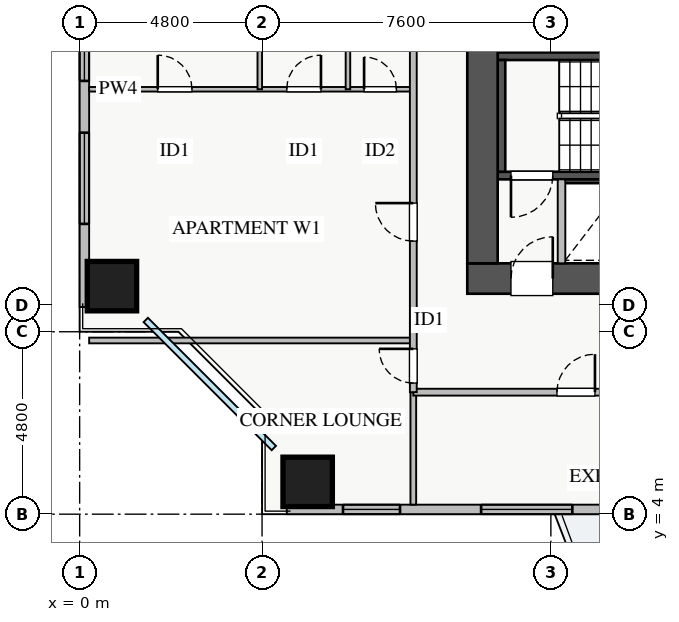
"""IFC4 building model, lengths in metres.
Left out: names, types, materials, properties, quantities, classifications, styles, units other than length and angle.
Written with IfcOpenShell. Run it as: python <this file> out.ifc"""

import sys

from ifc_helpers import new_model, si_unit, direction, frame, frame_2d, origin, origin_2d, place, context, subcontext, project, spatial, rectangle, extrude, source, transform, mapped, element, fill, save


model = new_model("IFC4")
c1 = context("Model", 3, precision=1e-05, world=origin(), true_north=direction((0.0, 1.0)))
c2 = subcontext(c1, "Body", "Model", "MODEL_VIEW")
j1 = project(units=[si_unit("LENGTHUNIT", "METRE"), si_unit("PLANEANGLEUNIT", "RADIAN")], contexts=[c1])
p1 = place(None, origin())
s1 = spatial("IfcSite", under=j1, at=p1, CompositionType="ELEMENT")
p2 = place(p1, origin())
s2 = spatial("IfcBuilding", under=s1, at=p2, CompositionType="ELEMENT")
p3 = place(p2, frame((0.0, 0.0, 23.0)))
s3 = spatial("IfcBuildingStorey", under=s2, at=p3, CompositionType="ELEMENT", Elevation=23.0)
p4 = place(p3, frame((12.68, 12.8, 0.0), z_axis=(0.0, 0.0, 1.0), x_axis=(1.0, 0.0, 0.0)))
e1 = element("IfcWall", 1, at=p4, inside=s3, PredefinedType="SHEAR", context=c2, shape_type="SweptSolid", body=[
    extrude(rectangle(XDim=1.94, YDim=0.18, at=frame_2d((0.97, 0.0))), origin(), (0.0, 0.0, 1.0), 3.07),
])
p5 = place(p3, frame((11.0, 12.91, 0.0), z_axis=(0.0, 0.0, 1.0), x_axis=(1.0, 0.0, 0.0)))
e2 = element("IfcWall", 2, at=p5, inside=s3, PredefinedType="SHEAR", context=c2, shape_type="SweptSolid", body=[
    extrude(rectangle(XDim=7.15, YDim=0.2, at=frame_2d((3.575, 0.0))), origin(), (0.0, 0.0, 1.0), 3.25),
])
p6 = place(p5, frame((0.35, 0.0, 0.0)))
e3 = element("IfcOpeningElement", 3, at=p6, cuts=e2, PredefinedType="OPENING", context=c2, shape_type="SweptSolid", body=[
    extrude(rectangle(XDim=1.1, YDim=2.05, at=frame_2d((0.55, 1.025))), frame((0.0, 0.11, 0.0), z_axis=(0.0, -1.0, 0.0), x_axis=(1.0, 0.0, 0.0)), (0.0, 0.0, 1.0), 0.22),
])
p7 = place(p3, frame((11.0, 16.05, 0.0), z_axis=(0.0, 0.0, 1.0), x_axis=(1.0, 0.0, 0.0)))
e4 = element("IfcWall", 4, at=p7, inside=s3, PredefinedType="SHEAR", context=c2, shape_type="SweptSolid", body=[
    extrude(rectangle(XDim=7.15, YDim=0.2, at=frame_2d((3.575, 0.0))), origin(), (0.0, 0.0, 1.0), 3.25),
])
p8 = place(p3, frame((11.1, 13.01, 0.0), z_axis=(0.0, 0.0, 1.0), x_axis=(0.0, 1.0, 0.0)))
e5 = element("IfcWall", 5, at=p8, inside=s3, PredefinedType="SHEAR", context=c2, shape_type="SweptSolid", body=[
    extrude(rectangle(XDim=2.94, YDim=0.2, at=frame_2d((1.47, 0.0))), origin(), (0.0, 0.0, 1.0), 3.25),
])
p9 = place(p3, frame((10.2, 10.2, 0.0), z_axis=(0.0, 0.0, 1.0), x_axis=(1.0, 0.0, 0.0)))
e6 = element("IfcWall", 6, at=p9, inside=s3, PredefinedType="SHEAR", context=c2, shape_type="SweptSolid", body=[
    extrude(rectangle(XDim=17.6, YDim=0.8, at=frame_2d((8.8, 0.0))), origin(), (0.0, 0.0, 1.0), 3.25),
])
p10 = place(p9, frame((1.15, 0.0, 0.0)))
e7 = element("IfcOpeningElement", 7, at=p10, cuts=e6, PredefinedType="OPENING", context=c2, shape_type="SweptSolid", body=[
    extrude(rectangle(XDim=1.1, YDim=2.05, at=frame_2d((0.55, 1.025))), frame((0.0, 0.41, 0.0), z_axis=(0.0, -1.0, 0.0), x_axis=(1.0, 0.0, 0.0)), (0.0, 0.0, 1.0), 0.82),
])
p11 = place(p9, frame((8.3, 0.0, 0.0)))
e8 = element("IfcOpeningElement", 8, at=p11, cuts=e6, PredefinedType="OPENING", context=c2, shape_type="SweptSolid", body=[
    extrude(rectangle(XDim=1.1, YDim=2.05, at=frame_2d((0.55, 1.025))), frame((0.0, 0.41, 0.0), z_axis=(0.0, -1.0, 0.0), x_axis=(1.0, 0.0, 0.0)), (0.0, 0.0, 1.0), 0.82),
])
p12 = place(p9, frame((10.05, 0.0, 0.0)))
e9 = element("IfcOpeningElement", 9, at=p12, cuts=e6, PredefinedType="OPENING", context=c2, shape_type="SweptSolid", body=[
    extrude(rectangle(XDim=1.1, YDim=2.05, at=frame_2d((0.55, 1.025))), frame((0.0, 0.41, 0.0), z_axis=(0.0, -1.0, 0.0), x_axis=(1.0, 0.0, 0.0)), (0.0, 0.0, 1.0), 0.82),
])
p13 = place(p9, frame((14.74, 0.0, 0.0)))
e10 = element("IfcOpeningElement", 10, at=p13, cuts=e6, PredefinedType="OPENING", context=c2, shape_type="SweptSolid", body=[
    extrude(rectangle(XDim=1.0, YDim=2.05, at=frame_2d((0.5, 1.025))), frame((0.0, 0.41, 0.0), z_axis=(0.0, -1.0, 0.0), x_axis=(1.0, 0.0, 0.0)), (0.0, 0.0, 1.0), 0.82),
])
p14 = place(p9, frame((11.835, 0.0, 0.0)))
e11 = element("IfcOpeningElement", 11, at=p14, cuts=e6, PredefinedType="OPENING", context=c2, shape_type="SweptSolid", body=[
    extrude(rectangle(XDim=1.0, YDim=2.05, at=frame_2d((0.5, 1.025))), frame((0.0, 0.41, 0.0), z_axis=(0.0, -1.0, 0.0), x_axis=(1.0, 0.0, 0.0)), (0.0, 0.0, 1.0), 0.82),
])
p15 = place(p9, frame((13.37, 0.0, 0.0)))
e12 = element("IfcOpeningElement", 12, at=p15, cuts=e6, PredefinedType="OPENING", context=c2, shape_type="SweptSolid", body=[
    extrude(rectangle(XDim=1.0, YDim=2.05, at=frame_2d((0.5, 1.025))), frame((0.0, 0.41, 0.0), z_axis=(0.0, -1.0, 0.0), x_axis=(1.0, 0.0, 0.0)), (0.0, 0.0, 1.0), 0.82),
])
p16 = place(p3, frame((10.6, 10.6, 0.0), z_axis=(0.0, 0.0, 1.0), x_axis=(0.0, 1.0, 0.0)))
e13 = element("IfcWall", 13, at=p16, inside=s3, PredefinedType="SHEAR", context=c2, shape_type="SweptSolid", body=[
    extrude(rectangle(XDim=5.6, YDim=0.8, at=frame_2d((2.8, 0.0))), origin(), (0.0, 0.0, 1.0), 3.25),
])
m1 = source(origin(), c2, "Body", "SweptSolid", [
    extrude(rectangle(XDim=1.3, YDim=1.3, at=origin_2d()), origin(), (0.0, 0.0, 1.0), 3.25),
])
for number, where, z_axis, x_axis in (
    (14, (6.0, 4.85, 0.0), (0.0, 0.0, 1.0), (1.0, 0.0, 0.0)),
    (15, (0.85, 10.0, 0.0), (0.0, 0.0, 1.0), (1.0, 0.0, 0.0)),
):
    element("IfcColumn", number, at=place(p3, frame(where, z_axis=z_axis, x_axis=x_axis)), inside=s3, PredefinedType="COLUMN", context=c2, shape_type="MappedRepresentation", body=[
        mapped(m1, transform((0.0, 0.0, 0.0), x_axis=(1.0, 0.0, 0.0), y_axis=(0.0, 1.0, 0.0), z_axis=(0.0, 0.0, 1.0), scale=1.0)),
    ])
p17 = place(p3, frame((5.45, 4.125, 0.0), z_axis=(0.0, 0.0, 1.0), x_axis=(1.0, 0.0, 0.0)))
e16 = element("IfcWall", 16, at=p17, inside=s3, PredefinedType="STANDARD", context=c2, shape_type="SweptSolid", body=[
    extrude(rectangle(XDim=27.1, YDim=0.25, at=frame_2d((13.55, 0.0))), origin(), (0.0, 0.0, 1.0), 2.61),
])
p18 = place(p17, frame((14.4, 0.0, 0.0)))
e17 = element("IfcOpeningElement", 17, at=p18, cuts=e16, PredefinedType="OPENING", context=c2, shape_type="SweptSolid", body=[
    extrude(rectangle(XDim=1.2, YDim=2.1, at=frame_2d((0.6, 1.05))), frame((0.0, 0.135, 0.0), z_axis=(0.0, -1.0, 0.0), x_axis=(1.0, 0.0, 0.0)), (0.0, 0.0, 1.0), 0.27),
])
p19 = place(p17, frame((1.48, 0.0, 0.9)))
e18 = element("IfcOpeningElement", 18, at=p19, cuts=e16, PredefinedType="OPENING", context=c2, shape_type="SweptSolid", body=[
    extrude(rectangle(XDim=1.5, YDim=1.5, at=frame_2d((0.75, 0.75))), frame((0.0, 0.135, 0.0), z_axis=(0.0, -1.0, 0.0), x_axis=(1.0, 0.0, 0.0)), (0.0, 0.0, 1.0), 0.27),
])
p20 = place(p17, frame((9.263, 0.0, 0.9)))
e19 = element("IfcOpeningElement", 19, at=p20, cuts=e16, PredefinedType="OPENING", context=c2, shape_type="SweptSolid", body=[
    extrude(rectangle(XDim=1.8, YDim=1.45, at=frame_2d((0.9, 0.725))), frame((0.0, 0.135, 0.0), z_axis=(0.0, -1.0, 0.0), x_axis=(1.0, 0.0, 0.0)), (0.0, 0.0, 1.0), 0.27),
])
p21 = place(p17, frame((16.188, 0.0, 0.9)))
e20 = element("IfcOpeningElement", 20, at=p21, cuts=e16, PredefinedType="OPENING", context=c2, shape_type="SweptSolid", body=[
    extrude(rectangle(XDim=1.5, YDim=1.45, at=frame_2d((0.75, 0.725))), frame((0.0, 0.135, 0.0), z_axis=(0.0, -1.0, 0.0), x_axis=(1.0, 0.0, 0.0)), (0.0, 0.0, 1.0), 0.27),
])
p22 = place(p17, frame((22.663, 0.0, 0.9)))
e21 = element("IfcOpeningElement", 21, at=p22, cuts=e16, PredefinedType="OPENING", context=c2, shape_type="SweptSolid", body=[
    extrude(rectangle(XDim=2.1, YDim=1.48, at=frame_2d((1.05, 0.74))), frame((0.0, 0.135, 0.0), z_axis=(0.0, -1.0, 0.0), x_axis=(1.0, 0.0, 0.0)), (0.0, 0.0, 1.0), 0.27),
])
p23 = place(p17, frame((5.114, 0.0, 0.9)))
e22 = element("IfcOpeningElement", 22, at=p23, cuts=e16, PredefinedType="OPENING", context=c2, shape_type="SweptSolid", body=[
    extrude(rectangle(XDim=2.4, YDim=1.5, at=frame_2d((1.2, 0.75))), frame((0.0, 0.135, 0.0), z_axis=(0.0, -1.0, 0.0), x_axis=(1.0, 0.0, 0.0)), (0.0, 0.0, 1.0), 0.27),
])
p24 = place(p3, frame((0.125, 9.45, 0.0), z_axis=(0.0, 0.0, 1.0), x_axis=(0.0, 1.0, 0.0)))
e23 = element("IfcWall", 23, at=p24, inside=s3, PredefinedType="STANDARD", context=c2, shape_type="SweptSolid", body=[
    extrude(rectangle(XDim=27.1, YDim=0.25, at=frame_2d((13.55, 0.0))), origin(), (0.0, 0.0, 1.0), 2.61),
])
p25 = place(p24, frame((14.4, 0.0, 0.0)))
e24 = element("IfcOpeningElement", 24, at=p25, cuts=e23, PredefinedType="OPENING", context=c2, shape_type="SweptSolid", body=[
    extrude(rectangle(XDim=1.2, YDim=2.1, at=frame_2d((0.6, 1.05))), frame((0.0, 0.135, 0.0), z_axis=(0.0, -1.0, 0.0), x_axis=(1.0, 0.0, 0.0)), (0.0, 0.0, 1.0), 0.27),
])
p26 = place(p24, frame((2.188, 0.0, 0.9)))
e25 = element("IfcOpeningElement", 25, at=p26, cuts=e23, PredefinedType="OPENING", context=c2, shape_type="SweptSolid", body=[
    extrude(rectangle(XDim=2.4, YDim=1.48, at=frame_2d((1.2, 0.74))), frame((0.0, 0.135, 0.0), z_axis=(0.0, -1.0, 0.0), x_axis=(1.0, 0.0, 0.0)), (0.0, 0.0, 1.0), 0.27),
])
p27 = place(p24, frame((22.663, 0.0, 0.9)))
e26 = element("IfcOpeningElement", 26, at=p27, cuts=e23, PredefinedType="OPENING", context=c2, shape_type="SweptSolid", body=[
    extrude(rectangle(XDim=2.1, YDim=1.48, at=frame_2d((1.05, 0.74))), frame((0.0, 0.135, 0.0), z_axis=(0.0, -1.0, 0.0), x_axis=(1.0, 0.0, 0.0)), (0.0, 0.0, 1.0), 0.27),
])
p28 = place(p24, frame((5.95, 0.0, 0.9)))
e27 = element("IfcOpeningElement", 27, at=p28, cuts=e23, PredefinedType="OPENING", context=c2, shape_type="SweptSolid", body=[
    extrude(rectangle(XDim=0.9, YDim=1.2, at=frame_2d((0.45, 0.6))), frame((0.0, 0.135, 0.0), z_axis=(0.0, -1.0, 0.0), x_axis=(1.0, 0.0, 0.0)), (0.0, 0.0, 1.0), 0.27),
])
p29 = place(p3, frame((12.68, 10.6, 0.0), z_axis=(0.0, 0.0, 1.0), x_axis=(0.0, 1.0, 0.0)))
e28 = element("IfcWall", 28, at=p29, inside=s3, PredefinedType="PARTITIONING", context=c2, shape_type="SweptSolid", body=[
    extrude(rectangle(XDim=2.21, YDim=0.2, at=frame_2d((1.105, 0.0))), origin(), (0.0, 0.0, 1.0), 3.07),
])
p30 = place(p3, frame((8.78, 4.25, 0.0), z_axis=(0.0, 0.0, 1.0), x_axis=(0.0, 1.0, 0.0)))
e29 = element("IfcWall", 29, at=p30, inside=s3, PredefinedType="PARTITIONING", context=c2, shape_type="SweptSolid", body=[
    extrude(rectangle(XDim=2.96, YDim=0.15, at=frame_2d((1.48, 0.0))), origin(), (0.0, 0.0, 1.0), 3.07),
])
p31 = place(p3, frame((8.78, 7.21, 0.0), z_axis=(0.0, 0.0, 1.0), x_axis=(1.0, 0.0, 0.0)))
e30 = element("IfcWall", 30, at=p31, inside=s3, PredefinedType="PARTITIONING", context=c2, shape_type="SweptSolid", body=[
    extrude(rectangle(XDim=23.54, YDim=0.18, at=frame_2d((11.77, 0.0))), origin(), (0.0, 0.0, 1.0), 3.07),
])
p32 = place(p31, frame((3.78, 0.0, 0.0)))
e31 = element("IfcOpeningElement", 31, at=p32, cuts=e30, PredefinedType="OPENING", context=c2, shape_type="SweptSolid", body=[
    extrude(rectangle(XDim=1.0, YDim=2.05, at=frame_2d((0.5, 1.025))), frame((0.0, 0.1, 0.0), z_axis=(0.0, -1.0, 0.0), x_axis=(1.0, 0.0, 0.0)), (0.0, 0.0, 1.0), 0.2),
])
p33 = place(p31, frame((11.625, 0.0, 0.0)))
e32 = element("IfcOpeningElement", 32, at=p33, cuts=e30, PredefinedType="OPENING", context=c2, shape_type="SweptSolid", body=[
    extrude(rectangle(XDim=1.0, YDim=2.05, at=frame_2d((0.5, 1.025))), frame((0.0, 0.1, 0.0), z_axis=(0.0, -1.0, 0.0), x_axis=(1.0, 0.0, 0.0)), (0.0, 0.0, 1.0), 0.2),
])
p34 = place(p31, frame((19.115, 0.0, 0.0)))
e33 = element("IfcOpeningElement", 33, at=p34, cuts=e30, PredefinedType="OPENING", context=c2, shape_type="SweptSolid", body=[
    extrude(rectangle(XDim=1.0, YDim=2.05, at=frame_2d((0.5, 1.025))), frame((0.0, 0.1, 0.0), z_axis=(0.0, -1.0, 0.0), x_axis=(1.0, 0.0, 0.0)), (0.0, 0.0, 1.0), 0.2),
])
p35 = place(p3, frame((0.25, 8.57, 0.0), z_axis=(0.0, 0.0, 1.0), x_axis=(1.0, 0.0, 0.0)))
e34 = element("IfcWall", 34, at=p35, inside=s3, PredefinedType="PARTITIONING", context=c2, shape_type="SweptSolid", body=[
    extrude(rectangle(XDim=8.53, YDim=0.15, at=frame_2d((4.265, 0.0))), origin(), (0.0, 0.0, 1.0), 3.07),
])
p36 = place(p3, frame((0.25, 15.18, 0.0), z_axis=(0.0, 0.0, 1.0), x_axis=(1.0, 0.0, 0.0)))
e35 = element("IfcWall", 35, at=p36, inside=s3, PredefinedType="PLUMBINGWALL", context=c2, shape_type="SweptSolid", body=[
    extrude(rectangle(XDim=8.53, YDim=0.12, at=frame_2d((4.265, 0.0))), origin(), (0.0, 0.0, 1.0), 3.07),
])
p37 = place(p36, frame((1.805, 0.0, 0.0)))
e36 = element("IfcOpeningElement", 36, at=p37, cuts=e35, PredefinedType="OPENING", context=c2, shape_type="SweptSolid", body=[
    extrude(rectangle(XDim=0.9, YDim=2.05, at=frame_2d((0.45, 1.025))), frame((0.0, 0.07, 0.0), z_axis=(0.0, -1.0, 0.0), x_axis=(1.0, 0.0, 0.0)), (0.0, 0.0, 1.0), 0.14),
])
p38 = place(p36, frame((5.2, 0.0, 0.0)))
e37 = element("IfcOpeningElement", 37, at=p38, cuts=e35, PredefinedType="OPENING", context=c2, shape_type="SweptSolid", body=[
    extrude(rectangle(XDim=0.9, YDim=2.05, at=frame_2d((0.45, 1.025))), frame((0.0, 0.07, 0.0), z_axis=(0.0, -1.0, 0.0), x_axis=(1.0, 0.0, 0.0)), (0.0, 0.0, 1.0), 0.14),
])
p39 = place(p36, frame((7.235, 0.0, 0.0)))
e38 = element("IfcOpeningElement", 38, at=p39, cuts=e35, PredefinedType="OPENING", context=c2, shape_type="SweptSolid", body=[
    extrude(rectangle(XDim=0.85, YDim=2.05, at=frame_2d((0.425, 1.025))), frame((0.0, 0.07, 0.0), z_axis=(0.0, -1.0, 0.0), x_axis=(1.0, 0.0, 0.0)), (0.0, 0.0, 1.0), 0.14),
])
for number, where, z_axis, x_axis in (
    (39, (4.74, 15.18, 0.0), (0.0, 0.0, 1.0), (0.0, 1.0, 0.0)),
    (40, (7.06, 15.18, 0.0), (0.0, 0.0, 1.0), (0.0, 1.0, 0.0)),
):
    element("IfcWall", number, at=place(p3, frame(where, z_axis=z_axis, x_axis=x_axis)), inside=s3, PredefinedType="PLUMBINGWALL", context=c2, shape_type="SweptSolid", body=[
        extrude(rectangle(XDim=7.16, YDim=0.12, at=frame_2d((3.58, 0.0))), origin(), (0.0, 0.0, 1.0), 3.07),
    ])
p40 = place(p3, frame((8.78, 7.21, 0.0), z_axis=(0.0, 0.0, 1.0), x_axis=(0.0, 1.0, 0.0)))
e41 = element("IfcWall", 41, at=p40, inside=s3, PredefinedType="PARTITIONING", context=c2, shape_type="SweptSolid", body=[
    extrude(rectangle(XDim=31.23, YDim=0.18, at=frame_2d((15.615, 0.0))), origin(), (0.0, 0.0, 1.0), 3.07),
])
p41 = place(p40, frame((30.09, 0.0, 0.0)))
e42 = element("IfcOpeningElement", 42, at=p41, cuts=e41, PredefinedType="OPENING", context=c2, shape_type="SweptSolid", body=[
    extrude(rectangle(XDim=0.9, YDim=2.05, at=frame_2d((0.45, 1.025))), frame((0.0, 0.1, 0.0), z_axis=(0.0, -1.0, 0.0), x_axis=(1.0, 0.0, 0.0)), (0.0, 0.0, 1.0), 0.2),
])
p42 = place(p40, frame((0.24, 0.0, 0.0)))
e43 = element("IfcOpeningElement", 43, at=p42, cuts=e41, PredefinedType="OPENING", context=c2, shape_type="SweptSolid", body=[
    extrude(rectangle(XDim=0.9, YDim=2.05, at=frame_2d((0.45, 1.025))), frame((0.0, 0.1, 0.0), z_axis=(0.0, -1.0, 0.0), x_axis=(1.0, 0.0, 0.0)), (0.0, 0.0, 1.0), 0.2),
])
p43 = place(p40, frame((3.975, 0.0, 0.0)))
e44 = element("IfcOpeningElement", 44, at=p43, cuts=e41, PredefinedType="OPENING", context=c2, shape_type="SweptSolid", body=[
    extrude(rectangle(XDim=1.0, YDim=2.05, at=frame_2d((0.5, 1.025))), frame((0.0, 0.1, 0.0), z_axis=(0.0, -1.0, 0.0), x_axis=(1.0, 0.0, 0.0)), (0.0, 0.0, 1.0), 0.2),
])
p44 = place(p40, frame((22.0, 0.0, 0.0)))
e45 = element("IfcOpeningElement", 45, at=p44, cuts=e41, PredefinedType="OPENING", context=c2, shape_type="SweptSolid", body=[
    extrude(rectangle(XDim=1.0, YDim=2.05, at=frame_2d((0.5, 1.025))), frame((0.0, 0.1, 0.0), z_axis=(0.0, -1.0, 0.0), x_axis=(1.0, 0.0, 0.0)), (0.0, 0.0, 1.0), 0.2),
])
m2 = source(origin(), c2, "Body", "SweptSolid", [
    extrude(rectangle(XDim=1.5, YDim=1.5, at=frame_2d((0.75, 0.75))), frame((0.0, 0.03, 0.0), z_axis=(0.0, -1.0, 0.0), x_axis=(1.0, 0.0, 0.0)), (0.0, 0.0, 1.0), 0.06),
])
p45 = place(p19, origin())
e46 = element("IfcWindow", 46, at=p45, inside=s3, PartitioningType="TRIPLE_PANEL_VERTICAL", PredefinedType="WINDOW", context=c2, shape_type="MappedRepresentation", body=[
    mapped(m2, transform((0.0, 0.0, 0.0), x_axis=(1.0, 0.0, 0.0), y_axis=(0.0, 1.0, 0.0), z_axis=(0.0, 0.0, 1.0), scale=1.0)),
])
fill(e18, e46)
m3 = source(origin(), c2, "Body", "SweptSolid", [
    extrude(rectangle(XDim=2.4, YDim=1.48, at=frame_2d((1.2, 0.74))), frame((0.0, 0.03, 0.0), z_axis=(0.0, -1.0, 0.0), x_axis=(1.0, 0.0, 0.0)), (0.0, 0.0, 1.0), 0.06),
])
p46 = place(p26, origin())
e47 = element("IfcWindow", 47, at=p46, inside=s3, PartitioningType="TRIPLE_PANEL_VERTICAL", PredefinedType="WINDOW", context=c2, shape_type="MappedRepresentation", body=[
    mapped(m3, transform((0.0, 0.0, 0.0), x_axis=(1.0, 0.0, 0.0), y_axis=(0.0, 1.0, 0.0), z_axis=(0.0, 0.0, 1.0), scale=1.0)),
])
fill(e25, e47)
m4 = source(origin(), c2, "Body", "SweptSolid", [
    extrude(rectangle(XDim=1.1, YDim=2.05, at=frame_2d((0.55, 1.025))), frame((0.0, 0.025, 0.0), z_axis=(0.0, -1.0, 0.0), x_axis=(1.0, 0.0, 0.0)), (0.0, 0.0, 1.0), 0.05),
])
p47 = place(p10, origin())
e48 = element("IfcDoor", 48, at=p47, inside=s3, OperationType="SINGLE_SWING_RIGHT", PredefinedType="DOOR", context=c2, shape_type="MappedRepresentation", body=[
    mapped(m4, transform((0.0, 0.0, 0.0), x_axis=(1.0, 0.0, 0.0), y_axis=(0.0, 1.0, 0.0), z_axis=(0.0, 0.0, 1.0), scale=1.0)),
])
fill(e7, e48)
p48 = place(p6, frame((1.1, 0.0, 0.0), z_axis=(0.0, 0.0, 1.0), x_axis=(-1.0, 0.0, 0.0)))
e49 = element("IfcDoor", 49, at=p48, inside=s3, OperationType="SINGLE_SWING_LEFT", PredefinedType="DOOR", context=c2, shape_type="MappedRepresentation", body=[
    mapped(m4, transform((0.0, 0.0, 0.0), x_axis=(1.0, 0.0, 0.0), y_axis=(0.0, 1.0, 0.0), z_axis=(0.0, 0.0, 1.0), scale=1.0)),
])
fill(e3, e49)
m5 = source(origin(), c2, "Body", "SweptSolid", [
    extrude(rectangle(XDim=1.0, YDim=2.05, at=frame_2d((0.5, 1.025))), frame((0.0, 0.025, 0.0), z_axis=(0.0, -1.0, 0.0), x_axis=(1.0, 0.0, 0.0)), (0.0, 0.0, 1.0), 0.05),
])
p49 = place(p32, origin())
e50 = element("IfcDoor", 50, at=p49, inside=s3, OperationType="SINGLE_SWING_RIGHT", PredefinedType="DOOR", context=c2, shape_type="MappedRepresentation", body=[
    mapped(m5, transform((0.0, 0.0, 0.0), x_axis=(1.0, 0.0, 0.0), y_axis=(0.0, 1.0, 0.0), z_axis=(0.0, 0.0, 1.0), scale=1.0)),
])
fill(e31, e50)
m6 = source(origin(), c2, "Body", "SweptSolid", [
    extrude(rectangle(XDim=0.9, YDim=2.05, at=frame_2d((0.45, 1.025))), frame((0.0, 0.025, 0.0), z_axis=(0.0, -1.0, 0.0), x_axis=(1.0, 0.0, 0.0)), (0.0, 0.0, 1.0), 0.05),
])
p50 = place(p37, origin())
e51 = element("IfcDoor", 51, at=p50, inside=s3, OperationType="SINGLE_SWING_LEFT", PredefinedType="DOOR", context=c2, shape_type="MappedRepresentation", body=[
    mapped(m6, transform((0.0, 0.0, 0.0), x_axis=(1.0, 0.0, 0.0), y_axis=(0.0, 1.0, 0.0), z_axis=(0.0, 0.0, 1.0), scale=1.0)),
])
fill(e36, e51)
p51 = place(p38, origin())
e52 = element("IfcDoor", 52, at=p51, inside=s3, OperationType="SINGLE_SWING_RIGHT", PredefinedType="DOOR", context=c2, shape_type="MappedRepresentation", body=[
    mapped(m6, transform((0.0, 0.0, 0.0), x_axis=(1.0, 0.0, 0.0), y_axis=(0.0, 1.0, 0.0), z_axis=(0.0, 0.0, 1.0), scale=1.0)),
])
fill(e37, e52)
m7 = source(origin(), c2, "Body", "SweptSolid", [
    extrude(rectangle(XDim=0.85, YDim=2.05, at=frame_2d((0.425, 1.025))), frame((0.0, 0.025, 0.0), z_axis=(0.0, -1.0, 0.0), x_axis=(1.0, 0.0, 0.0)), (0.0, 0.0, 1.0), 0.05),
])
p52 = place(p39, origin())
e53 = element("IfcDoor", 53, at=p52, inside=s3, OperationType="SINGLE_SWING_LEFT", PredefinedType="DOOR", context=c2, shape_type="MappedRepresentation", body=[
    mapped(m7, transform((0.0, 0.0, 0.0), x_axis=(1.0, 0.0, 0.0), y_axis=(0.0, 1.0, 0.0), z_axis=(0.0, 0.0, 1.0), scale=1.0)),
])
fill(e38, e53)
p53 = place(p42, origin())
e54 = element("IfcDoor", 54, at=p53, inside=s3, OperationType="SINGLE_SWING_RIGHT", PredefinedType="DOOR", context=c2, shape_type="MappedRepresentation", body=[
    mapped(m6, transform((0.0, 0.0, 0.0), x_axis=(1.0, 0.0, 0.0), y_axis=(0.0, 1.0, 0.0), z_axis=(0.0, 0.0, 1.0), scale=1.0)),
])
fill(e43, e54)
p54 = place(p43, origin())
e55 = element("IfcDoor", 55, at=p54, inside=s3, OperationType="SINGLE_SWING_RIGHT", PredefinedType="DOOR", context=c2, shape_type="MappedRepresentation", body=[
    mapped(m5, transform((0.0, 0.0, 0.0), x_axis=(1.0, 0.0, 0.0), y_axis=(0.0, 1.0, 0.0), z_axis=(0.0, 0.0, 1.0), scale=1.0)),
])
fill(e44, e55)
m8 = source(origin(), c2, "Body", "SweptSolid", [
    extrude(rectangle(XDim=2.4, YDim=1.5, at=frame_2d((1.2, 0.75))), frame((0.0, 0.03, 0.0), z_axis=(0.0, -1.0, 0.0), x_axis=(1.0, 0.0, 0.0)), (0.0, 0.0, 1.0), 0.06),
])
p55 = place(p23, origin())
e56 = element("IfcWindow", 56, at=p55, inside=s3, PartitioningType="TRIPLE_PANEL_VERTICAL", PredefinedType="WINDOW", context=c2, shape_type="MappedRepresentation", body=[
    mapped(m8, transform((0.0, 0.0, 0.0), x_axis=(1.0, 0.0, 0.0), y_axis=(0.0, 1.0, 0.0), z_axis=(0.0, 0.0, 1.0), scale=1.0)),
])
fill(e22, e56)
m9 = source(origin(), c2, "Body", "SweptSolid", [
    extrude(rectangle(XDim=0.9, YDim=1.2, at=frame_2d((0.45, 0.6))), frame((0.0, 0.03, 0.0), z_axis=(0.0, -1.0, 0.0), x_axis=(1.0, 0.0, 0.0)), (0.0, 0.0, 1.0), 0.06),
])
p56 = place(p28, origin())
e57 = element("IfcWindow", 57, at=p56, inside=s3, PartitioningType="SINGLE_PANEL", PredefinedType="WINDOW", context=c2, shape_type="MappedRepresentation", body=[
    mapped(m9, transform((0.0, 0.0, 0.0), x_axis=(1.0, 0.0, 0.0), y_axis=(0.0, 1.0, 0.0), z_axis=(0.0, 0.0, 1.0), scale=1.0)),
])
fill(e27, e57)
save(model, sys.argv[1])
